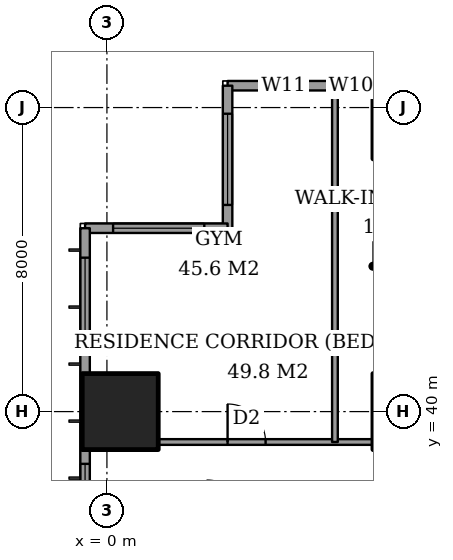
"""IFC4 building model, lengths in metres.
Left out: names, types, materials, properties, quantities, classifications, styles, units other than length and angle.
Written with IfcOpenShell. Run it as: python <this file> out.ifc"""

import sys

from ifc_helpers import new_model, si_unit, direction, frame, frame_2d, origin, origin_2d, place, context, subcontext, project, spatial, rectangle, extrude, element, fill, save


model = new_model("IFC4")
c1 = context("Model", 3, precision=1e-05, world=origin(), true_north=direction((0.0, 1.0)))
c2 = subcontext(c1, "Body", "Model", "MODEL_VIEW")
j1 = project(units=[si_unit("LENGTHUNIT", "METRE"), si_unit("PLANEANGLEUNIT", "RADIAN")], contexts=[c1])
p1 = place(None, origin())
s1 = spatial("IfcSite", under=j1, at=p1, CompositionType="ELEMENT")
p2 = place(p1, origin())
s2 = spatial("IfcBuilding", under=s1, at=p2, CompositionType="ELEMENT")
p3 = place(p2, frame((0.0, 0.0, 125.0)))
s3 = spatial("IfcBuildingStorey", under=s2, at=p3, CompositionType="ELEMENT", Elevation=125.0)
p4 = place(p3, frame((0.35, 40.0, 0.0), z_axis=(0.0, 0.0, 1.0), x_axis=(1.0, 0.0, 0.0)))
e1 = element("IfcColumn", 1, at=p4, inside=s3, PredefinedType="COLUMN", context=c2, shape_type="SweptSolid", body=[
    extrude(rectangle(XDim=2.0, YDim=2.0, at=origin_2d()), origin(), (0.0, 0.0, 1.0), 3.6),
])
p5 = place(p3, frame((24.575, 48.575, 0.0), z_axis=(0.0, 0.0, 1.0), x_axis=(-1.0, 0.0, 0.0)))
e2 = element("IfcWall", 2, at=p5, inside=s3, PredefinedType="SOLIDWALL", context=c2, shape_type="SweptSolid", body=[
    extrude(rectangle(XDim=21.4, YDim=0.25, at=frame_2d((10.7, 0.0))), origin(), (0.0, 0.0, 1.0), 3.6),
])
p6 = place(p5, frame((2.275, 0.0, 0.4)))
e3 = element("IfcOpeningElement", 3, at=p6, cuts=e2, PredefinedType="OPENING", context=c2, shape_type="SweptSolid", body=[
    extrude(rectangle(XDim=1.2, YDim=2.2, at=frame_2d((0.6, 1.1))), frame((0.0, 0.135, 0.0), z_axis=(0.0, -1.0, 0.0), x_axis=(1.0, 0.0, 0.0)), (0.0, 0.0, 1.0), 0.27),
])
p7 = place(p5, frame((4.425, 0.0, 0.4)))
e4 = element("IfcOpeningElement", 4, at=p7, cuts=e2, PredefinedType="OPENING", context=c2, shape_type="SweptSolid", body=[
    extrude(rectangle(XDim=2.4, YDim=2.2, at=frame_2d((1.2, 1.1))), frame((0.0, 0.135, 0.0), z_axis=(0.0, -1.0, 0.0), x_axis=(1.0, 0.0, 0.0)), (0.0, 0.0, 1.0), 0.27),
])
p8 = place(p5, frame((10.4, 0.0, 0.4)))
e5 = element("IfcOpeningElement", 5, at=p8, cuts=e2, PredefinedType="OPENING", context=c2, shape_type="SweptSolid", body=[
    extrude(rectangle(XDim=1.2, YDim=2.2, at=frame_2d((0.6, 1.1))), frame((0.0, 0.135, 0.0), z_axis=(0.0, -1.0, 0.0), x_axis=(1.0, 0.0, 0.0)), (0.0, 0.0, 1.0), 0.27),
])
p9 = place(p5, frame((12.475, 0.0, 0.4)))
e6 = element("IfcOpeningElement", 6, at=p9, cuts=e2, PredefinedType="OPENING", context=c2, shape_type="SweptSolid", body=[
    extrude(rectangle(XDim=2.4, YDim=2.2, at=frame_2d((1.2, 1.1))), frame((0.0, 0.135, 0.0), z_axis=(0.0, -1.0, 0.0), x_axis=(1.0, 0.0, 0.0)), (0.0, 0.0, 1.0), 0.27),
])
p10 = place(p5, frame((17.85, 0.0, 0.4)))
e7 = element("IfcOpeningElement", 7, at=p10, cuts=e2, PredefinedType="OPENING", context=c2, shape_type="SweptSolid", body=[
    extrude(rectangle(XDim=0.6, YDim=2.2, at=frame_2d((0.3, 1.1))), frame((0.0, 0.135, 0.0), z_axis=(0.0, -1.0, 0.0), x_axis=(1.0, 0.0, 0.0)), (0.0, 0.0, 1.0), 0.27),
])
p11 = place(p5, frame((19.325, 0.0, 0.4)))
e8 = element("IfcOpeningElement", 8, at=p11, cuts=e2, PredefinedType="OPENING", context=c2, shape_type="SweptSolid", body=[
    extrude(rectangle(XDim=1.2, YDim=2.2, at=frame_2d((0.6, 1.1))), frame((0.0, 0.135, 0.0), z_axis=(0.0, -1.0, 0.0), x_axis=(1.0, 0.0, 0.0)), (0.0, 0.0, 1.0), 0.27),
])
p12 = place(p3, frame((3.175, 48.575, 0.0), z_axis=(0.0, 0.0, 1.0), x_axis=(0.0, -1.0, 0.0)))
e9 = element("IfcWall", 9, at=p12, inside=s3, PredefinedType="SOLIDWALL", context=c2, shape_type="SweptSolid", body=[
    extrude(rectangle(XDim=3.75, YDim=0.25, at=frame_2d((1.875, 0.0))), origin(), (0.0, 0.0, 1.0), 3.6),
])
p13 = place(p12, frame((0.738, 0.0, 0.4)))
e10 = element("IfcOpeningElement", 10, at=p13, cuts=e9, PredefinedType="OPENING", context=c2, shape_type="SweptSolid", body=[
    extrude(rectangle(XDim=2.4, YDim=2.2, at=frame_2d((1.2, 1.1))), frame((0.0, 0.135, 0.0), z_axis=(0.0, -1.0, 0.0), x_axis=(1.0, 0.0, 0.0)), (0.0, 0.0, 1.0), 0.27),
])
p14 = place(p3, frame((3.175, 44.825, 0.0), z_axis=(0.0, 0.0, 1.0), x_axis=(-1.0, 0.0, 0.0)))
e11 = element("IfcWall", 11, at=p14, inside=s3, PredefinedType="SOLIDWALL", context=c2, shape_type="SweptSolid", body=[
    extrude(rectangle(XDim=3.75, YDim=0.25, at=frame_2d((1.875, 0.0))), origin(), (0.0, 0.0, 1.0), 3.6),
])
p15 = place(p14, frame((0.613, 0.0, 0.4)))
e12 = element("IfcOpeningElement", 12, at=p15, cuts=e11, PredefinedType="OPENING", context=c2, shape_type="SweptSolid", body=[
    extrude(rectangle(XDim=2.4, YDim=2.2, at=frame_2d((1.2, 1.1))), frame((0.0, 0.135, 0.0), z_axis=(0.0, -1.0, 0.0), x_axis=(1.0, 0.0, 0.0)), (0.0, 0.0, 1.0), 0.27),
])
p16 = place(p3, frame((-0.575, 44.825, 0.0), z_axis=(0.0, 0.0, 1.0), x_axis=(0.0, -1.0, 0.0)))
e13 = element("IfcWall", 13, at=p16, inside=s3, PredefinedType="SOLIDWALL", context=c2, shape_type="SweptSolid", body=[
    extrude(rectangle(XDim=41.65, YDim=0.25, at=frame_2d((20.825, 0.0))), origin(), (0.0, 0.0, 1.0), 3.6),
])
p17 = place(p16, frame((0.775, 0.0, 0.4)))
e14 = element("IfcOpeningElement", 14, at=p17, cuts=e13, PredefinedType="OPENING", context=c2, shape_type="SweptSolid", body=[
    extrude(rectangle(XDim=2.4, YDim=2.2, at=frame_2d((1.2, 1.1))), frame((0.0, 0.135, 0.0), z_axis=(0.0, -1.0, 0.0), x_axis=(1.0, 0.0, 0.0)), (0.0, 0.0, 1.0), 0.27),
])
p18 = place(p16, frame((6.2, 0.0, 0.4)))
e15 = element("IfcOpeningElement", 15, at=p18, cuts=e13, PredefinedType="OPENING", context=c2, shape_type="SweptSolid", body=[
    extrude(rectangle(XDim=1.2, YDim=2.2, at=frame_2d((0.6, 1.1))), frame((0.0, 0.135, 0.0), z_axis=(0.0, -1.0, 0.0), x_axis=(1.0, 0.0, 0.0)), (0.0, 0.0, 1.0), 0.27),
])
p19 = place(p16, frame((8.525, 0.0, 0.4)))
e16 = element("IfcOpeningElement", 16, at=p19, cuts=e13, PredefinedType="OPENING", context=c2, shape_type="SweptSolid", body=[
    extrude(rectangle(XDim=2.4, YDim=2.2, at=frame_2d((1.2, 1.1))), frame((0.0, 0.135, 0.0), z_axis=(0.0, -1.0, 0.0), x_axis=(1.0, 0.0, 0.0)), (0.0, 0.0, 1.0), 0.27),
])
p20 = place(p16, frame((15.625, 0.0, 0.4)))
e17 = element("IfcOpeningElement", 17, at=p20, cuts=e13, PredefinedType="OPENING", context=c2, shape_type="SweptSolid", body=[
    extrude(rectangle(XDim=2.4, YDim=2.2, at=frame_2d((1.2, 1.1))), frame((0.0, 0.135, 0.0), z_axis=(0.0, -1.0, 0.0), x_axis=(1.0, 0.0, 0.0)), (0.0, 0.0, 1.0), 0.27),
])
p21 = place(p16, frame((23.625, 0.0, 0.4)))
e18 = element("IfcOpeningElement", 18, at=p21, cuts=e13, PredefinedType="OPENING", context=c2, shape_type="SweptSolid", body=[
    extrude(rectangle(XDim=2.4, YDim=2.2, at=frame_2d((1.2, 1.1))), frame((0.0, 0.135, 0.0), z_axis=(0.0, -1.0, 0.0), x_axis=(1.0, 0.0, 0.0)), (0.0, 0.0, 1.0), 0.27),
])
p22 = place(p16, frame((30.825, 0.0, 0.4)))
e19 = element("IfcOpeningElement", 19, at=p22, cuts=e13, PredefinedType="OPENING", context=c2, shape_type="SweptSolid", body=[
    extrude(rectangle(XDim=2.4, YDim=2.2, at=frame_2d((1.2, 1.1))), frame((0.0, 0.135, 0.0), z_axis=(0.0, -1.0, 0.0), x_axis=(1.0, 0.0, 0.0)), (0.0, 0.0, 1.0), 0.27),
])
p23 = place(p16, frame((34.5, 0.0, 0.4)))
e20 = element("IfcOpeningElement", 20, at=p23, cuts=e13, PredefinedType="OPENING", context=c2, shape_type="SweptSolid", body=[
    extrude(rectangle(XDim=1.2, YDim=2.2, at=frame_2d((0.6, 1.1))), frame((0.0, 0.135, 0.0), z_axis=(0.0, -1.0, 0.0), x_axis=(1.0, 0.0, 0.0)), (0.0, 0.0, 1.0), 0.27),
])
p24 = place(p16, frame((38.475, 0.0, 0.4)))
e21 = element("IfcOpeningElement", 21, at=p24, cuts=e13, PredefinedType="OPENING", context=c2, shape_type="SweptSolid", body=[
    extrude(rectangle(XDim=2.4, YDim=2.2, at=frame_2d((1.2, 1.1))), frame((0.0, 0.135, 0.0), z_axis=(0.0, -1.0, 0.0), x_axis=(1.0, 0.0, 0.0)), (0.0, 0.0, 1.0), 0.27),
])
p25 = place(p3, frame((1.35, 39.2, 0.0), z_axis=(0.0, 0.0, 1.0), x_axis=(1.0, 0.0, 0.0)))
e22 = element("IfcWall", 22, at=p25, inside=s3, PredefinedType="PARTITIONING", context=c2, shape_type="SweptSolid", body=[
    extrude(rectangle(XDim=5.65, YDim=0.15, at=frame_2d((2.825, 0.0))), origin(), (0.0, 0.0, 1.0), 3.35),
])
p26 = place(p25, frame((1.825, 0.0, 0.0)))
e23 = element("IfcOpeningElement", 23, at=p26, cuts=e22, PredefinedType="OPENING", context=c2, shape_type="SweptSolid", body=[
    extrude(rectangle(XDim=1.0, YDim=2.1, at=frame_2d((0.5, 1.05))), frame((0.0, 0.085, 0.0), z_axis=(0.0, -1.0, 0.0), x_axis=(1.0, 0.0, 0.0)), (0.0, 0.0, 1.0), 0.17),
])
p27 = place(p3, frame((6.0, 39.2, 0.0), z_axis=(0.0, 0.0, 1.0), x_axis=(0.0, 1.0, 0.0)))
e24 = element("IfcWall", 24, at=p27, inside=s3, PredefinedType="PARTITIONING", context=c2, shape_type="SweptSolid", body=[
    extrude(rectangle(XDim=9.25, YDim=0.15, at=frame_2d((4.625, 0.0))), origin(), (0.0, 0.0, 1.0), 3.35),
])
p28 = place(p10, origin())
e25 = element("IfcWindow", 25, at=p28, inside=s3, PartitioningType="SINGLE_PANEL", PredefinedType="WINDOW", context=c2, shape_type="SweptSolid", body=[
    extrude(rectangle(XDim=0.6, YDim=2.2, at=frame_2d((0.3, 1.1))), frame((0.0, 0.03, 0.0), z_axis=(0.0, -1.0, 0.0), x_axis=(1.0, 0.0, 0.0)), (0.0, 0.0, 1.0), 0.06),
])
fill(e7, e25)
p29 = place(p11, origin())
e26 = element("IfcWindow", 26, at=p29, inside=s3, PartitioningType="SINGLE_PANEL", PredefinedType="WINDOW", context=c2, shape_type="SweptSolid", body=[
    extrude(rectangle(XDim=1.2, YDim=2.2, at=frame_2d((0.6, 1.1))), frame((0.0, 0.03, 0.0), z_axis=(0.0, -1.0, 0.0), x_axis=(1.0, 0.0, 0.0)), (0.0, 0.0, 1.0), 0.06),
])
fill(e8, e26)
p30 = place(p13, origin())
e27 = element("IfcWindow", 27, at=p30, inside=s3, PartitioningType="SINGLE_PANEL", PredefinedType="WINDOW", context=c2, shape_type="SweptSolid", body=[
    extrude(rectangle(XDim=2.4, YDim=2.2, at=frame_2d((1.2, 1.1))), frame((0.0, 0.03, 0.0), z_axis=(0.0, -1.0, 0.0), x_axis=(1.0, 0.0, 0.0)), (0.0, 0.0, 1.0), 0.06),
])
fill(e10, e27)
p31 = place(p15, origin())
e28 = element("IfcWindow", 28, at=p31, inside=s3, PartitioningType="SINGLE_PANEL", PredefinedType="WINDOW", context=c2, shape_type="SweptSolid", body=[
    extrude(rectangle(XDim=2.4, YDim=2.2, at=frame_2d((1.2, 1.1))), frame((0.0, 0.03, 0.0), z_axis=(0.0, -1.0, 0.0), x_axis=(1.0, 0.0, 0.0)), (0.0, 0.0, 1.0), 0.06),
])
fill(e12, e28)
p32 = place(p17, origin())
e29 = element("IfcWindow", 29, at=p32, inside=s3, PartitioningType="SINGLE_PANEL", PredefinedType="WINDOW", context=c2, shape_type="SweptSolid", body=[
    extrude(rectangle(XDim=2.4, YDim=2.2, at=frame_2d((1.2, 1.1))), frame((0.0, 0.03, 0.0), z_axis=(0.0, -1.0, 0.0), x_axis=(1.0, 0.0, 0.0)), (0.0, 0.0, 1.0), 0.06),
])
fill(e14, e29)
p33 = place(p18, origin())
e30 = element("IfcWindow", 30, at=p33, inside=s3, PartitioningType="SINGLE_PANEL", PredefinedType="WINDOW", context=c2, shape_type="SweptSolid", body=[
    extrude(rectangle(XDim=1.2, YDim=2.2, at=frame_2d((0.6, 1.1))), frame((0.0, 0.03, 0.0), z_axis=(0.0, -1.0, 0.0), x_axis=(1.0, 0.0, 0.0)), (0.0, 0.0, 1.0), 0.06),
])
fill(e15, e30)
p34 = place(p26, origin())
e31 = element("IfcDoor", 31, at=p34, inside=s3, OperationType="SINGLE_SWING_RIGHT", PredefinedType="DOOR", context=c2, shape_type="SweptSolid", body=[
    extrude(rectangle(XDim=1.0, YDim=2.1, at=frame_2d((0.5, 1.05))), frame((0.0, 0.025, 0.0), z_axis=(0.0, -1.0, 0.0), x_axis=(1.0, 0.0, 0.0)), (0.0, 0.0, 1.0), 0.05),
])
fill(e23, e31)
save(model, sys.argv[1])
